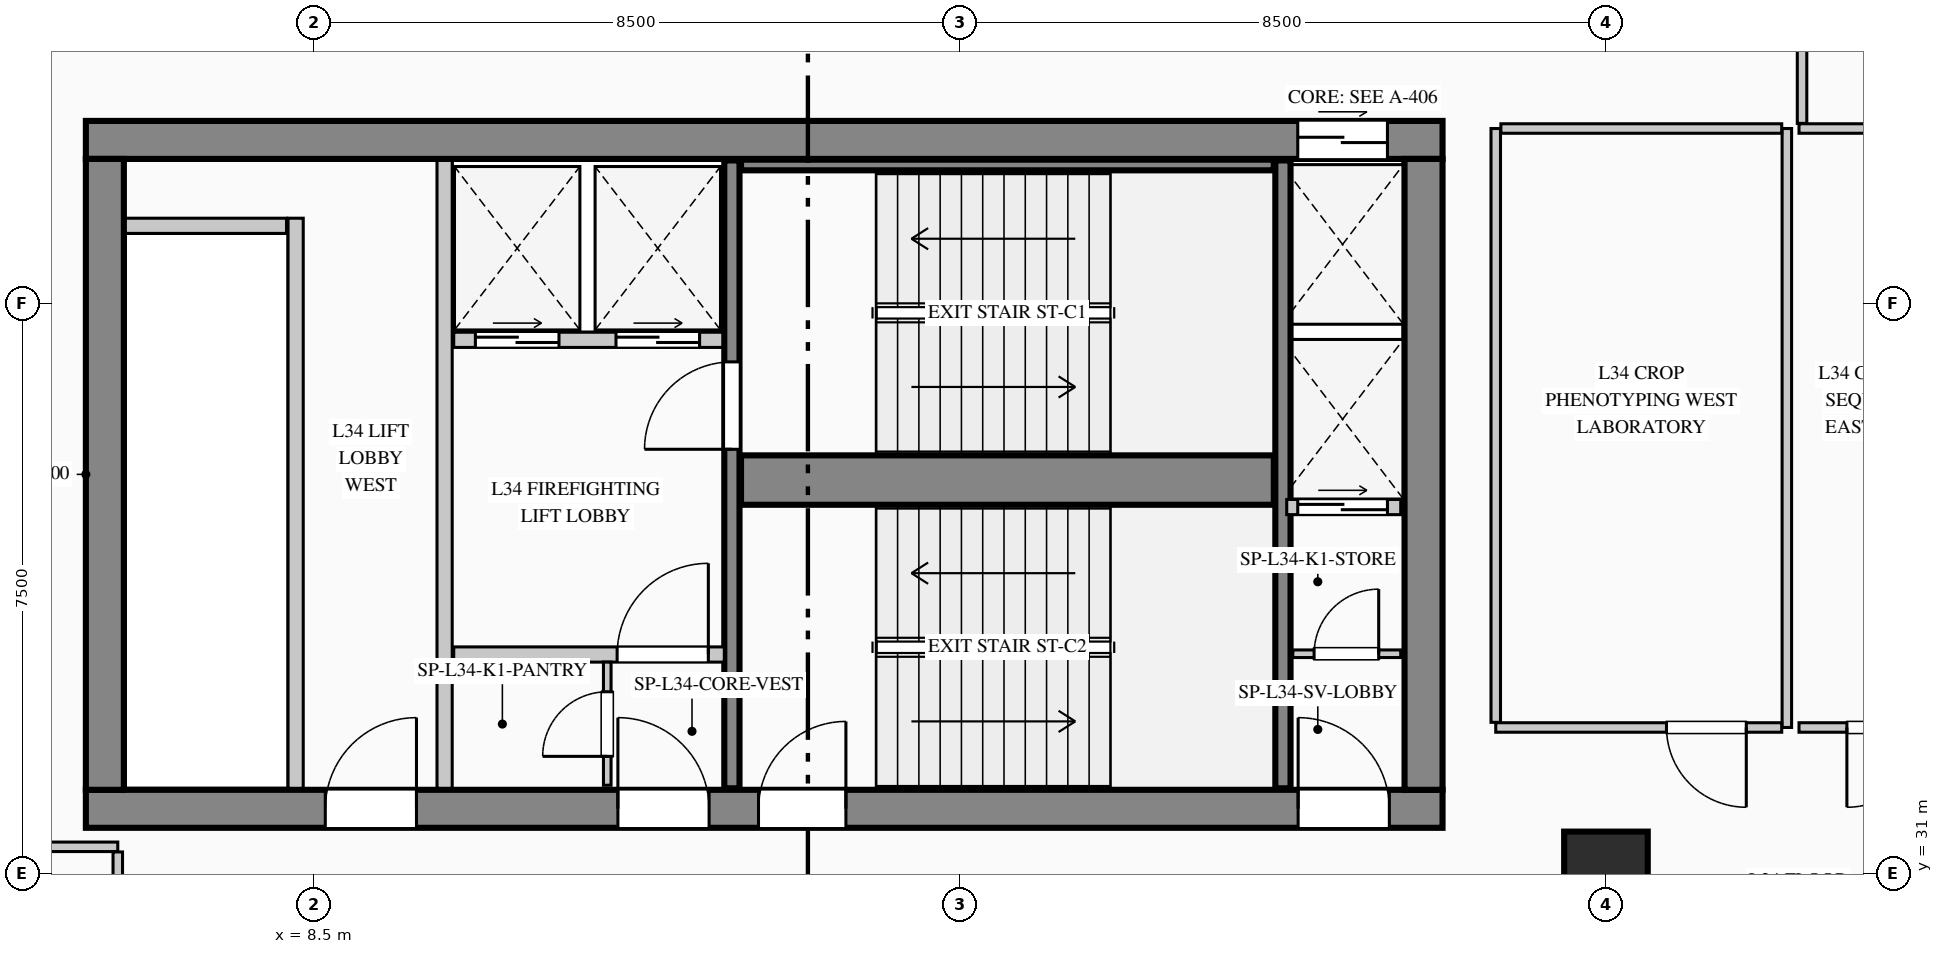
"""IFC4 building model, lengths in metres.
Left out: names, types, materials, properties, quantities, classifications, styles, units other than length and angle.
Written with IfcOpenShell. Run it as: python <this file> out.ifc"""

import sys

from ifc_helpers import new_model, si_unit, direction, frame, frame_2d, origin, origin_2d, place, context, subcontext, project, spatial, rectangle, extrude, element, fill, save


model = new_model("IFC4")
c1 = context("Model", 3, precision=1e-05, world=origin(), true_north=direction((0.0, 1.0)))
c2 = subcontext(c1, "Body", "Model", "MODEL_VIEW")
j1 = project(units=[si_unit("LENGTHUNIT", "METRE"), si_unit("PLANEANGLEUNIT", "RADIAN")], contexts=[c1])
p1 = place(None, origin())
s1 = spatial("IfcSite", under=j1, at=p1, CompositionType="ELEMENT")
p2 = place(p1, origin())
s2 = spatial("IfcBuilding", under=s1, at=p2, CompositionType="ELEMENT")
p3 = place(p2, frame((0.0, 0.0, 146.95)))
s3 = spatial("IfcBuildingStorey", under=s2, at=p3, CompositionType="ELEMENT", Elevation=146.95)
p4 = place(p3, frame((5.5, 40.65, 0.0), z_axis=(0.0, 0.0, 1.0), x_axis=(1.0, 0.0, 0.0)))
e1 = element("IfcWall", 1, at=p4, inside=s3, PredefinedType="SHEAR", context=c2, shape_type="SweptSolid", body=[
    extrude(rectangle(XDim=17.85, YDim=0.5, at=frame_2d((8.925, 0.0))), origin(), (0.0, 0.0, 1.0), 3.95),
])
p5 = place(p4, frame((15.945, 0.0, 0.0)))
e2 = element("IfcOpeningElement", 2, at=p5, cuts=e1, PredefinedType="OPENING", context=c2, shape_type="SweptSolid", body=[
    extrude(rectangle(XDim=1.18, YDim=2.25, at=frame_2d((0.59, 1.125))), frame((0.0, 0.26, 0.0), z_axis=(0.0, -1.0, 0.0), x_axis=(1.0, 0.0, 0.0)), (0.0, 0.0, 1.0), 0.52),
])
p6 = place(p3, frame((5.5, 31.85, 0.0), z_axis=(0.0, 0.0, 1.0), x_axis=(1.0, 0.0, 0.0)))
e3 = element("IfcWall", 3, at=p6, inside=s3, PredefinedType="SHEAR", context=c2, shape_type="SweptSolid", body=[
    extrude(rectangle(XDim=17.85, YDim=0.5, at=frame_2d((8.925, 0.0))), origin(), (0.0, 0.0, 1.0), 3.95),
])
p7 = place(p6, frame((3.15, 0.0, 0.0)))
e4 = element("IfcOpeningElement", 4, at=p7, cuts=e3, PredefinedType="OPENING", context=c2, shape_type="SweptSolid", body=[
    extrude(rectangle(XDim=1.2, YDim=2.2, at=frame_2d((0.6, 1.1))), frame((0.0, 0.26, 0.0), z_axis=(0.0, -1.0, 0.0), x_axis=(1.0, 0.0, 0.0)), (0.0, 0.0, 1.0), 0.52),
])
p8 = place(p6, frame((7.0, 0.0, 0.0)))
e5 = element("IfcOpeningElement", 5, at=p8, cuts=e3, PredefinedType="OPENING", context=c2, shape_type="SweptSolid", body=[
    extrude(rectangle(XDim=1.2, YDim=2.2, at=frame_2d((0.6, 1.1))), frame((0.0, 0.26, 0.0), z_axis=(0.0, -1.0, 0.0), x_axis=(1.0, 0.0, 0.0)), (0.0, 0.0, 1.0), 0.52),
])
p9 = place(p6, frame((8.85, 0.0, 0.0)))
e6 = element("IfcOpeningElement", 6, at=p9, cuts=e3, PredefinedType="OPENING", context=c2, shape_type="SweptSolid", body=[
    extrude(rectangle(XDim=1.15, YDim=2.2, at=frame_2d((0.575, 1.1))), frame((0.0, 0.26, 0.0), z_axis=(0.0, -1.0, 0.0), x_axis=(1.0, 0.0, 0.0)), (0.0, 0.0, 1.0), 0.52),
])
p10 = place(p6, frame((15.95, 0.0, 0.0)))
e7 = element("IfcOpeningElement", 7, at=p10, cuts=e3, PredefinedType="OPENING", context=c2, shape_type="SweptSolid", body=[
    extrude(rectangle(XDim=1.2, YDim=2.2, at=frame_2d((0.6, 1.1))), frame((0.0, 0.26, 0.0), z_axis=(0.0, -1.0, 0.0), x_axis=(1.0, 0.0, 0.0)), (0.0, 0.0, 1.0), 0.52),
])
for number, where, z_axis, x_axis in (
    (8, (5.75, 32.1, 0.0), (0.0, 0.0, 1.0), (0.0, 1.0, 0.0)),
    (9, (23.1, 32.1, 0.0), (0.0, 0.0, 1.0), (0.0, 1.0, 0.0)),
):
    element("IfcWall", number, at=place(p3, frame(where, z_axis=z_axis, x_axis=x_axis)), inside=s3, PredefinedType="SHEAR", context=c2, shape_type="SweptSolid", body=[
        extrude(rectangle(XDim=8.3, YDim=0.5, at=frame_2d((4.15, 0.0))), origin(), (0.0, 0.0, 1.0), 3.95),
    ])
p11 = place(p3, frame((14.0, 32.12, 0.0), z_axis=(0.0, 0.0, 1.0), x_axis=(0.0, 1.0, 0.0)))
e10 = element("IfcWall", 10, at=p11, inside=s3, PredefinedType="SHEAR", context=c2, shape_type="SweptSolid", body=[
    extrude(rectangle(XDim=8.26, YDim=0.2, at=frame_2d((4.13, 0.0))), origin(), (0.0, 0.0, 1.0), 3.95),
])
p12 = place(p11, frame((4.46, 0.0, 0.0)))
e11 = element("IfcOpeningElement", 11, at=p12, cuts=e10, PredefinedType="OPENING", context=c2, shape_type="SweptSolid", body=[
    extrude(rectangle(XDim=1.15, YDim=2.2, at=frame_2d((0.575, 1.1))), frame((0.0, 0.11, 0.0), z_axis=(0.0, -1.0, 0.0), x_axis=(1.0, 0.0, 0.0)), (0.0, 0.0, 1.0), 0.22),
])
p13 = place(p3, frame((14.12, 36.175, 0.0), z_axis=(0.0, 0.0, 1.0), x_axis=(1.0, 0.0, 0.0)))
e12 = element("IfcWall", 12, at=p13, inside=s3, PredefinedType="SHEAR", context=c2, shape_type="SweptSolid", body=[
    extrude(rectangle(XDim=7.01, YDim=0.65, at=frame_2d((3.505, 0.0))), origin(), (0.0, 0.0, 1.0), 3.95),
])
p14 = place(p3, frame((21.25, 32.12, 0.0), z_axis=(0.0, 0.0, 1.0), x_axis=(0.0, 1.0, 0.0)))
e13 = element("IfcWall", 13, at=p14, inside=s3, PredefinedType="SHEAR", context=c2, shape_type="SweptSolid", body=[
    extrude(rectangle(XDim=8.26, YDim=0.2, at=frame_2d((4.13, 0.0))), origin(), (0.0, 0.0, 1.0), 3.95),
])
p15 = place(p3, frame((14.12, 40.32, 0.0), z_axis=(0.0, 0.0, 1.0), x_axis=(1.0, 0.0, 0.0)))
e14 = element("IfcWall", 14, at=p15, inside=s3, PredefinedType="SHEAR", context=c2, shape_type="SweptSolid", body=[
    extrude(rectangle(XDim=7.01, YDim=0.14, at=frame_2d((3.505, 0.0))), origin(), (0.0, 0.0, 1.0), 3.95),
])
p16 = place(p3, frame((25.5, 31.0, 0.0), z_axis=(0.0, 0.0, 1.0), x_axis=(1.0, 0.0, 0.0)))
e15 = element("IfcColumn", 15, at=p16, inside=s3, PredefinedType="COLUMN", context=c2, shape_type="SweptSolid", body=[
    extrude(rectangle(XDim=1.1, YDim=1.1, at=origin_2d()), origin(), (0.0, 0.0, 1.0), 3.95),
])
p17 = place(p3, frame((7.993, 4.73, 0.0), z_axis=(0.0, 0.0, 1.0), x_axis=(-0.136989009016, 0.990572567462, 0.0)))
e16 = element("IfcWall", 16, at=p17, inside=s3, PredefinedType="STANDARD", context=c2, shape_type="SweptSolid", body=[
    extrude(rectangle(XDim=36.888, YDim=0.26, at=frame_2d((18.444, 0.0))), origin(), (0.0, 0.0, 1.0), 3.69),
])
p18 = place(p17, frame((19.435, 0.0, 0.9)))
e17 = element("IfcOpeningElement", 17, at=p18, cuts=e16, PredefinedType="OPENING", context=c2, shape_type="SweptSolid", body=[
    extrude(rectangle(XDim=2.1, YDim=2.0, at=frame_2d((1.05, 1.0))), frame((0.0, 0.14, 0.0), z_axis=(0.0, -1.0, 0.0), x_axis=(1.0, 0.0, 0.0)), (0.0, 0.0, 1.0), 0.28),
])
p19 = place(p3, frame((8.26, 32.12, 0.0), z_axis=(0.0, 0.0, 1.0), x_axis=(0.0, 1.0, 0.0)))
e18 = element("IfcWall", 18, at=p19, inside=s3, PredefinedType="PARTITIONING", context=c2, shape_type="SweptSolid", body=[
    extrude(rectangle(XDim=7.5, YDim=0.2, at=frame_2d((3.75, 0.0))), origin(), (0.0, 0.0, 1.0), 3.69),
])
p20 = place(p3, frame((6.02, 39.52, 0.0), z_axis=(0.0, 0.0, 1.0), x_axis=(1.0, 0.0, 0.0)))
e19 = element("IfcWall", 19, at=p20, inside=s3, PredefinedType="PARTITIONING", context=c2, shape_type="SweptSolid", body=[
    extrude(rectangle(XDim=2.12, YDim=0.2, at=frame_2d((1.06, 0.0))), origin(), (0.0, 0.0, 1.0), 3.69),
])
p21 = place(p3, frame((10.22, 32.12, 0.0), z_axis=(0.0, 0.0, 1.0), x_axis=(0.0, 1.0, 0.0)))
e20 = element("IfcWall", 20, at=p21, inside=s3, PredefinedType="PARTITIONING", context=c2, shape_type="SweptSolid", body=[
    extrude(rectangle(XDim=8.26, YDim=0.2, at=frame_2d((4.13, 0.0))), origin(), (0.0, 0.0, 1.0), 3.69),
])
p22 = place(p3, frame((10.34, 38.02, 0.0), z_axis=(0.0, 0.0, 1.0), x_axis=(1.0, 0.0, 0.0)))
e21 = element("IfcWall", 21, at=p22, inside=s3, PredefinedType="PARTITIONING", context=c2, shape_type="SweptSolid", body=[
    extrude(rectangle(XDim=3.54, YDim=0.2, at=frame_2d((1.77, 0.0))), origin(), (0.0, 0.0, 1.0), 3.69),
])
p23 = place(p22, frame((0.285, 0.0, 0.0)))
e22 = element("IfcOpeningElement", 22, at=p23, cuts=e21, PredefinedType="OPENING", context=c2, shape_type="SweptSolid", body=[
    extrude(rectangle(XDim=1.1, YDim=2.2, at=frame_2d((0.55, 1.1))), frame((0.0, 0.11, 0.0), z_axis=(0.0, -1.0, 0.0), x_axis=(1.0, 0.0, 0.0)), (0.0, 0.0, 1.0), 0.22),
])
p24 = place(p22, frame((2.135, 0.0, 0.0)))
e23 = element("IfcOpeningElement", 23, at=p24, cuts=e21, PredefinedType="OPENING", context=c2, shape_type="SweptSolid", body=[
    extrude(rectangle(XDim=1.1, YDim=2.2, at=frame_2d((0.55, 1.1))), frame((0.0, 0.11, 0.0), z_axis=(0.0, -1.0, 0.0), x_axis=(1.0, 0.0, 0.0)), (0.0, 0.0, 1.0), 0.22),
])
p25 = place(p3, frame((10.34, 33.88, 0.0), z_axis=(0.0, 0.0, 1.0), x_axis=(1.0, 0.0, 0.0)))
e24 = element("IfcWall", 24, at=p25, inside=s3, PredefinedType="PARTITIONING", context=c2, shape_type="SweptSolid", body=[
    extrude(rectangle(XDim=3.56, YDim=0.2, at=frame_2d((1.78, 0.0))), origin(), (0.0, 0.0, 1.0), 3.69),
])
p26 = place(p25, frame((2.15, 0.0, 0.0)))
e25 = element("IfcOpeningElement", 25, at=p26, cuts=e24, PredefinedType="OPENING", context=c2, shape_type="SweptSolid", body=[
    extrude(rectangle(XDim=1.2, YDim=2.2, at=frame_2d((0.6, 1.1))), frame((0.0, 0.11, 0.0), z_axis=(0.0, -1.0, 0.0), x_axis=(1.0, 0.0, 0.0)), (0.0, 0.0, 1.0), 0.22),
])
p27 = place(p3, frame((12.36, 32.16, 0.0), z_axis=(0.0, 0.0, 1.0), x_axis=(0.0, 1.0, 0.0)))
e26 = element("IfcWall", 26, at=p27, inside=s3, PredefinedType="PARTITIONING", context=c2, shape_type="SweptSolid", body=[
    extrude(rectangle(XDim=1.62, YDim=0.1, at=frame_2d((0.81, 0.0))), origin(), (0.0, 0.0, 1.0), 3.69),
])
p28 = place(p27, frame((0.38, 0.0, 0.0)))
e27 = element("IfcOpeningElement", 27, at=p28, cuts=e26, PredefinedType="OPENING", context=c2, shape_type="SweptSolid", body=[
    extrude(rectangle(XDim=0.85, YDim=2.1, at=frame_2d((0.425, 1.05))), frame((0.0, 0.06, 0.0), z_axis=(0.0, -1.0, 0.0), x_axis=(1.0, 0.0, 0.0)), (0.0, 0.0, 1.0), 0.12),
])
p29 = place(p3, frame((21.38, 33.89, 0.0), z_axis=(0.0, 0.0, 1.0), x_axis=(1.0, 0.0, 0.0)))
e28 = element("IfcWall", 28, at=p29, inside=s3, PredefinedType="PARTITIONING", context=c2, shape_type="SweptSolid", body=[
    extrude(rectangle(XDim=1.42, YDim=0.1, at=frame_2d((0.71, 0.0))), origin(), (0.0, 0.0, 1.0), 3.69),
])
p30 = place(p29, frame((0.28, 0.0, 0.0)))
e29 = element("IfcOpeningElement", 29, at=p30, cuts=e28, PredefinedType="OPENING", context=c2, shape_type="SweptSolid", body=[
    extrude(rectangle(XDim=0.85, YDim=2.1, at=frame_2d((0.425, 1.05))), frame((0.0, 0.06, 0.0), z_axis=(0.0, -1.0, 0.0), x_axis=(1.0, 0.0, 0.0)), (0.0, 0.0, 1.0), 0.12),
])
p31 = place(p3, frame((21.3, 35.82, 0.0), z_axis=(0.0, 0.0, 1.0), x_axis=(1.0, 0.0, 0.0)))
e30 = element("IfcWall", 30, at=p31, inside=s3, PredefinedType="PARTITIONING", context=c2, shape_type="SweptSolid", body=[
    extrude(rectangle(XDim=1.5, YDim=0.2, at=frame_2d((0.75, 0.0))), origin(), (0.0, 0.0, 1.0), 3.69),
])
p32 = place(p31, frame((0.145, 0.0, 0.0)))
e31 = element("IfcOpeningElement", 31, at=p32, cuts=e30, PredefinedType="OPENING", context=c2, shape_type="SweptSolid", body=[
    extrude(rectangle(XDim=1.18, YDim=2.25, at=frame_2d((0.59, 1.125))), frame((0.0, 0.11, 0.0), z_axis=(0.0, -1.0, 0.0), x_axis=(1.0, 0.0, 0.0)), (0.0, 0.0, 1.0), 0.22),
])
p33 = place(p3, frame((27.88, 40.8, 0.0), z_axis=(0.0, 0.0, 1.0), x_axis=(0.0, -1.0, 0.0)))
e32 = element("IfcWall", 32, at=p33, inside=s3, PredefinedType="PARTITIONING", context=c2, shape_type="SweptSolid", body=[
    extrude(rectangle(XDim=7.88, YDim=0.125, at=frame_2d((3.94, 0.0))), origin(), (0.0, 0.0, 1.0), 3.69),
])
p34 = place(p3, frame((27.812, 32.92, 0.0), z_axis=(0.0, 0.0, 1.0), x_axis=(-1.0, 0.0, 0.0)))
e33 = element("IfcWall", 33, at=p34, inside=s3, PredefinedType="PARTITIONING", context=c2, shape_type="SweptSolid", body=[
    extrude(rectangle(XDim=3.762, YDim=0.125, at=frame_2d((1.881, 0.0))), origin(), (0.0, 0.0, 1.0), 3.69),
])
p35 = place(p34, frame((0.466, 0.0, 0.0)))
e34 = element("IfcOpeningElement", 34, at=p35, cuts=e33, PredefinedType="OPENING", context=c2, shape_type="SweptSolid", body=[
    extrude(rectangle(XDim=1.05, YDim=2.15, at=frame_2d((0.525, 1.075))), frame((0.0, 0.073, 0.0), z_axis=(0.0, -1.0, 0.0), x_axis=(1.0, 0.0, 0.0)), (0.0, 0.0, 1.0), 0.145),
])
p36 = place(p3, frame((24.05, 32.988, 0.0), z_axis=(0.0, 0.0, 1.0), x_axis=(0.0, 1.0, 0.0)))
e35 = element("IfcWall", 35, at=p36, inside=s3, PredefinedType="PARTITIONING", context=c2, shape_type="SweptSolid", body=[
    extrude(rectangle(XDim=7.812, YDim=0.125, at=frame_2d((3.906, 0.0))), origin(), (0.0, 0.0, 1.0), 3.69),
])
p37 = place(p3, frame((24.117, 40.8, 0.0), z_axis=(0.0, 0.0, 1.0), x_axis=(1.0, 0.0, 0.0)))
e36 = element("IfcWall", 36, at=p37, inside=s3, PredefinedType="PARTITIONING", context=c2, shape_type="SweptSolid", body=[
    extrude(rectangle(XDim=3.695, YDim=0.125, at=frame_2d((1.848, 0.0))), origin(), (0.0, 0.0, 1.0), 3.69),
])
p38 = place(p3, frame((30.35, 32.92, 0.0), z_axis=(0.0, 0.0, 1.0), x_axis=(-1.0, 0.0, 0.0)))
e37 = element("IfcWall", 37, at=p38, inside=s3, PredefinedType="PARTITIONING", context=c2, shape_type="SweptSolid", body=[
    extrude(rectangle(XDim=2.31, YDim=0.125, at=frame_2d((1.155, 0.0))), origin(), (0.0, 0.0, 1.0), 3.69),
])
p39 = place(p38, frame((0.63, 0.0, 0.0)))
e38 = element("IfcOpeningElement", 38, at=p39, cuts=e37, PredefinedType="OPENING", context=c2, shape_type="SweptSolid", body=[
    extrude(rectangle(XDim=1.05, YDim=2.15, at=frame_2d((0.525, 1.075))), frame((0.0, 0.073, 0.0), z_axis=(0.0, -1.0, 0.0), x_axis=(1.0, 0.0, 0.0)), (0.0, 0.0, 1.0), 0.145),
])
p40 = place(p3, frame((28.04, 40.8, 0.0), z_axis=(0.0, 0.0, 1.0), x_axis=(1.0, 0.0, 0.0)))
e39 = element("IfcWall", 39, at=p40, inside=s3, PredefinedType="PARTITIONING", context=c2, shape_type="SweptSolid", body=[
    extrude(rectangle(XDim=2.31, YDim=0.125, at=frame_2d((1.155, 0.0))), origin(), (0.0, 0.0, 1.0), 3.69),
])
p41 = place(p3, frame((4.448, 31.35, 0.0), z_axis=(0.0, 0.0, 1.0), x_axis=(1.0, 0.0, 0.0)))
e40 = element("IfcWall", 40, at=p41, inside=s3, PredefinedType="PARTITIONING", context=c2, shape_type="SweptSolid", body=[
    extrude(rectangle(XDim=1.472, YDim=0.125, at=frame_2d((0.736, 0.0))), origin(), (0.0, 0.0, 1.0), 3.69),
])
p42 = place(p3, frame((5.92, 31.282, 0.0), z_axis=(0.0, 0.0, 1.0), x_axis=(0.0, -1.0, 0.0)))
e41 = element("IfcWall", 41, at=p42, inside=s3, PredefinedType="PARTITIONING", context=c2, shape_type="SweptSolid", body=[
    extrude(rectangle(XDim=2.682, YDim=0.125, at=frame_2d((1.341, 0.0))), origin(), (0.0, 0.0, 1.0), 3.69),
])
p43 = place(p3, frame((28.08, 40.867, 0.0), z_axis=(0.0, 0.0, 1.0), x_axis=(0.0, 1.0, 0.0)))
e42 = element("IfcWall", 42, at=p43, inside=s3, PredefinedType="PARTITIONING", context=c2, shape_type="SweptSolid", body=[
    extrude(rectangle(XDim=2.397, YDim=0.125, at=frame_2d((1.199, 0.0))), origin(), (0.0, 0.0, 1.0), 3.69),
])
p44 = place(p7, origin())
e43 = element("IfcDoor", 43, at=p44, inside=s3, OperationType="SINGLE_SWING_RIGHT", PredefinedType="DOOR", context=c2, shape_type="SweptSolid", body=[
    extrude(rectangle(XDim=1.2, YDim=2.2, at=frame_2d((0.6, 1.1))), frame((0.0, 0.025, 0.0), z_axis=(0.0, -1.0, 0.0), x_axis=(1.0, 0.0, 0.0)), (0.0, 0.0, 1.0), 0.05),
])
fill(e4, e43)
p45 = place(p8, origin())
e44 = element("IfcDoor", 44, at=p45, inside=s3, OperationType="SINGLE_SWING_LEFT", PredefinedType="DOOR", context=c2, shape_type="SweptSolid", body=[
    extrude(rectangle(XDim=1.2, YDim=2.2, at=frame_2d((0.6, 1.1))), frame((0.0, 0.025, 0.0), z_axis=(0.0, -1.0, 0.0), x_axis=(1.0, 0.0, 0.0)), (0.0, 0.0, 1.0), 0.05),
])
fill(e5, e44)
p46 = place(p9, origin())
e45 = element("IfcDoor", 45, at=p46, inside=s3, OperationType="SINGLE_SWING_RIGHT", PredefinedType="DOOR", context=c2, shape_type="SweptSolid", body=[
    extrude(rectangle(XDim=1.15, YDim=2.2, at=frame_2d((0.575, 1.1))), frame((0.0, 0.025, 0.0), z_axis=(0.0, -1.0, 0.0), x_axis=(1.0, 0.0, 0.0)), (0.0, 0.0, 1.0), 0.05),
])
fill(e6, e45)
p47 = place(p10, origin())
e46 = element("IfcDoor", 46, at=p47, inside=s3, OperationType="SINGLE_SWING_LEFT", PredefinedType="DOOR", context=c2, shape_type="SweptSolid", body=[
    extrude(rectangle(XDim=1.2, YDim=2.2, at=frame_2d((0.6, 1.1))), frame((0.0, 0.025, 0.0), z_axis=(0.0, -1.0, 0.0), x_axis=(1.0, 0.0, 0.0)), (0.0, 0.0, 1.0), 0.05),
])
fill(e7, e46)
p48 = place(p26, origin())
e47 = element("IfcDoor", 47, at=p48, inside=s3, OperationType="SINGLE_SWING_RIGHT", PredefinedType="DOOR", context=c2, shape_type="SweptSolid", body=[
    extrude(rectangle(XDim=1.2, YDim=2.2, at=frame_2d((0.6, 1.1))), frame((0.0, 0.025, 0.0), z_axis=(0.0, -1.0, 0.0), x_axis=(1.0, 0.0, 0.0)), (0.0, 0.0, 1.0), 0.05),
])
fill(e25, e47)
p49 = place(p28, origin())
e48 = element("IfcDoor", 48, at=p49, inside=s3, OperationType="SINGLE_SWING_LEFT", PredefinedType="DOOR", context=c2, shape_type="SweptSolid", body=[
    extrude(rectangle(XDim=0.85, YDim=2.1, at=frame_2d((0.425, 1.05))), frame((0.0, 0.025, 0.0), z_axis=(0.0, -1.0, 0.0), x_axis=(1.0, 0.0, 0.0)), (0.0, 0.0, 1.0), 0.05),
])
fill(e27, e48)
p50 = place(p30, origin())
e49 = element("IfcDoor", 49, at=p50, inside=s3, OperationType="SINGLE_SWING_RIGHT", PredefinedType="DOOR", context=c2, shape_type="SweptSolid", body=[
    extrude(rectangle(XDim=0.85, YDim=2.1, at=frame_2d((0.425, 1.05))), frame((0.0, 0.025, 0.0), z_axis=(0.0, -1.0, 0.0), x_axis=(1.0, 0.0, 0.0)), (0.0, 0.0, 1.0), 0.05),
])
fill(e29, e49)
p51 = place(p12, origin())
e50 = element("IfcDoor", 50, at=p51, inside=s3, OperationType="SINGLE_SWING_LEFT", PredefinedType="DOOR", context=c2, shape_type="SweptSolid", body=[
    extrude(rectangle(XDim=1.15, YDim=2.2, at=frame_2d((0.575, 1.1))), frame((0.0, 0.025, 0.0), z_axis=(0.0, -1.0, 0.0), x_axis=(1.0, 0.0, 0.0)), (0.0, 0.0, 1.0), 0.05),
])
fill(e11, e50)
p52 = place(p23, origin())
e51 = element("IfcDoor", 51, at=p52, inside=s3, OperationType="DOUBLE_DOOR_SLIDING", PredefinedType="DOOR", context=c2, shape_type="SweptSolid", body=[
    extrude(rectangle(XDim=1.1, YDim=2.2, at=frame_2d((0.55, 1.1))), frame((0.0, 0.025, 0.0), z_axis=(0.0, -1.0, 0.0), x_axis=(1.0, 0.0, 0.0)), (0.0, 0.0, 1.0), 0.05),
])
fill(e22, e51)
p53 = place(p24, origin())
e52 = element("IfcDoor", 52, at=p53, inside=s3, OperationType="DOUBLE_DOOR_SLIDING", PredefinedType="DOOR", context=c2, shape_type="SweptSolid", body=[
    extrude(rectangle(XDim=1.1, YDim=2.2, at=frame_2d((0.55, 1.1))), frame((0.0, 0.025, 0.0), z_axis=(0.0, -1.0, 0.0), x_axis=(1.0, 0.0, 0.0)), (0.0, 0.0, 1.0), 0.05),
])
fill(e23, e52)
p54 = place(p5, origin())
e53 = element("IfcDoor", 53, at=p54, inside=s3, OperationType="DOUBLE_DOOR_SLIDING", PredefinedType="DOOR", context=c2, shape_type="SweptSolid", body=[
    extrude(rectangle(XDim=1.18, YDim=2.25, at=frame_2d((0.59, 1.125))), frame((0.0, 0.025, 0.0), z_axis=(0.0, -1.0, 0.0), x_axis=(1.0, 0.0, 0.0)), (0.0, 0.0, 1.0), 0.05),
])
fill(e2, e53)
p55 = place(p32, origin())
e54 = element("IfcDoor", 54, at=p55, inside=s3, OperationType="DOUBLE_DOOR_SLIDING", PredefinedType="DOOR", context=c2, shape_type="SweptSolid", body=[
    extrude(rectangle(XDim=1.18, YDim=2.25, at=frame_2d((0.59, 1.125))), frame((0.0, 0.025, 0.0), z_axis=(0.0, -1.0, 0.0), x_axis=(1.0, 0.0, 0.0)), (0.0, 0.0, 1.0), 0.05),
])
fill(e31, e54)
p56 = place(p35, origin())
e55 = element("IfcDoor", 55, at=p56, inside=s3, OperationType="SINGLE_SWING_LEFT", PredefinedType="DOOR", context=c2, shape_type="SweptSolid", body=[
    extrude(rectangle(XDim=1.05, YDim=2.15, at=frame_2d((0.525, 1.075))), frame((0.0, 0.025, 0.0), z_axis=(0.0, -1.0, 0.0), x_axis=(1.0, 0.0, 0.0)), (0.0, 0.0, 1.0), 0.05),
])
fill(e34, e55)
p57 = place(p39, origin())
e56 = element("IfcDoor", 56, at=p57, inside=s3, OperationType="SINGLE_SWING_RIGHT", PredefinedType="DOOR", context=c2, shape_type="SweptSolid", body=[
    extrude(rectangle(XDim=1.05, YDim=2.15, at=frame_2d((0.525, 1.075))), frame((0.0, 0.025, 0.0), z_axis=(0.0, -1.0, 0.0), x_axis=(1.0, 0.0, 0.0)), (0.0, 0.0, 1.0), 0.05),
])
fill(e38, e56)
save(model, sys.argv[1])
